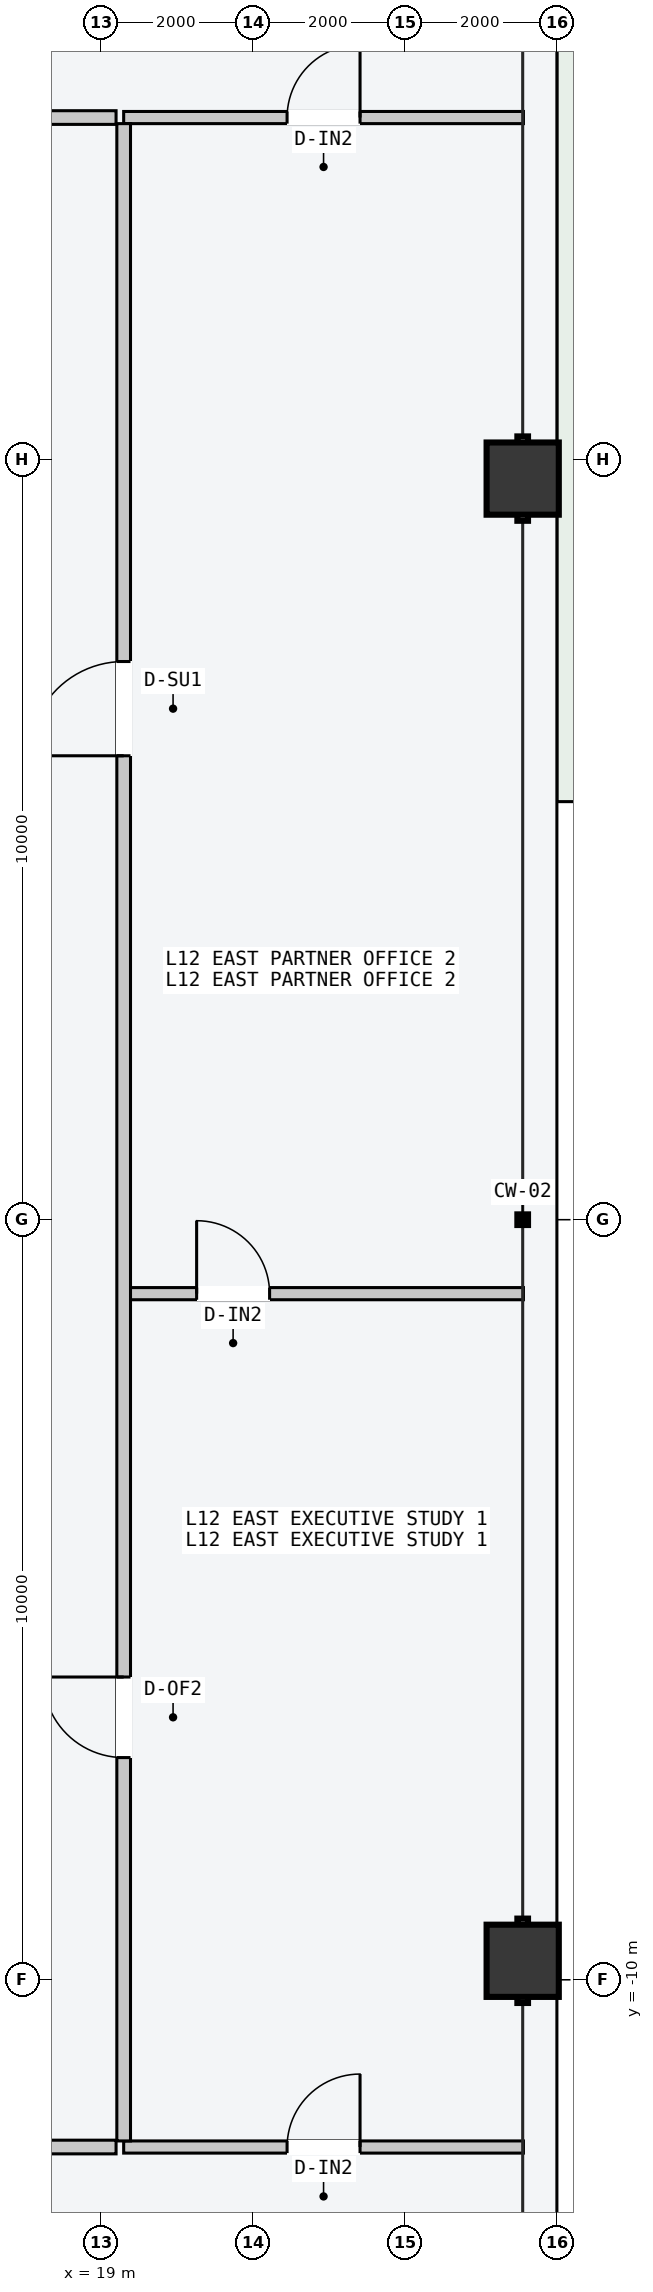
"""IFC4 building model, lengths in metres.
Left out: names, types, materials, properties, quantities, classifications, styles, units other than length and angle.
Written with IfcOpenShell. Run it as: python <this file> out.ifc"""

import sys

from ifc_helpers import new_model, si_unit, direction, frame, frame_2d, origin, origin_2d, place, context, subcontext, project, spatial, rectangle, hollow_rectangle, extrude, element, fill, save


model = new_model("IFC4")
c1 = context("Model", 3, precision=1e-05, world=origin(), true_north=direction((0.0, 1.0)))
c2 = subcontext(c1, "Body", "Model", "MODEL_VIEW")
j1 = project(units=[si_unit("LENGTHUNIT", "METRE"), si_unit("PLANEANGLEUNIT", "RADIAN")], contexts=[c1])
p1 = place(None, origin())
s1 = spatial("IfcSite", under=j1, at=p1, CompositionType="ELEMENT")
p2 = place(p1, origin())
s2 = spatial("IfcBuilding", under=s1, at=p2, CompositionType="ELEMENT")
p3 = place(p2, frame((0.0, 0.0, 49.2)))
s3 = spatial("IfcBuildingStorey", under=s2, at=p3, CompositionType="ELEMENT", Elevation=49.2)
for number, where, z_axis, x_axis in (
    (1, (24.55, -9.75, 0.0), (0.0, 0.0, 1.0), (0.0, 1.0, 0.0)),
    (2, (24.55, 9.75, 0.0), (0.0, 0.0, 1.0), (0.0, 1.0, 0.0)),
):
    element("IfcColumn", number, at=place(p3, frame(where, z_axis=z_axis, x_axis=x_axis)), inside=s3, PredefinedType="COLUMN", context=c2, shape_type="SweptSolid", body=[
        extrude(hollow_rectangle(XDim=0.95, YDim=0.95, WallThickness=0.048, at=origin_2d()), origin(), (0.0, 0.0, 1.0), 3.6),
    ])
p4 = place(p3, frame((-19.2, 14.5, 0.0), z_axis=(0.0, 0.0, 1.0), x_axis=(1.0, 0.0, 0.0)))
e3 = element("IfcWall", 3, at=p4, inside=s3, PredefinedType="PARTITIONING", context=c2, shape_type="SweptSolid", body=[
    extrude(rectangle(XDim=38.4, YDim=0.18, at=frame_2d((19.2, 0.0))), origin(), (0.0, 0.0, 1.0), 3.4),
])
p5 = place(p4, frame((3.515, 0.0, 0.0)))
e4 = element("IfcOpeningElement", 4, at=p5, cuts=e3, PredefinedType="OPENING", context=c2, shape_type="SweptSolid", body=[
    extrude(rectangle(XDim=1.02, YDim=2.2, at=frame_2d((0.51, 1.1))), frame((0.0, 0.1, 0.0), z_axis=(0.0, -1.0, 0.0), x_axis=(1.0, 0.0, 0.0)), (0.0, 0.0, 1.0), 0.2),
])
p6 = place(p4, frame((14.091, 0.0, 0.0)))
e5 = element("IfcOpeningElement", 5, at=p6, cuts=e3, PredefinedType="OPENING", context=c2, shape_type="SweptSolid", body=[
    extrude(rectangle(XDim=1.06, YDim=2.2, at=frame_2d((0.53, 1.1))), frame((0.0, 0.1, 0.0), z_axis=(0.0, -1.0, 0.0), x_axis=(1.0, 0.0, 0.0)), (0.0, 0.0, 1.0), 0.2),
])
p7 = place(p4, frame((24.752, 0.0, 0.0)))
e6 = element("IfcOpeningElement", 6, at=p7, cuts=e3, PredefinedType="OPENING", context=c2, shape_type="SweptSolid", body=[
    extrude(rectangle(XDim=1.24, YDim=2.24, at=frame_2d((0.62, 1.12))), frame((0.0, 0.1, 0.0), z_axis=(0.0, -1.0, 0.0), x_axis=(1.0, 0.0, 0.0)), (0.0, 0.0, 1.0), 0.2),
])
p8 = place(p4, frame((33.277, 0.0, 0.0)))
e7 = element("IfcOpeningElement", 7, at=p8, cuts=e3, PredefinedType="OPENING", context=c2, shape_type="SweptSolid", body=[
    extrude(rectangle(XDim=1.4, YDim=2.2, at=frame_2d((0.7, 1.1))), frame((0.0, 0.1, 0.0), z_axis=(0.0, -1.0, 0.0), x_axis=(1.0, 0.0, 0.0)), (0.0, 0.0, 1.0), 0.2),
])
p9 = place(p3, frame((19.3, 14.5, 0.0), z_axis=(0.0, 0.0, 1.0), x_axis=(1.0, 0.0, 0.0)))
e8 = element("IfcWall", 8, at=p9, inside=s3, PredefinedType="PARTITIONING", context=c2, shape_type="SweptSolid", body=[
    extrude(rectangle(XDim=5.26, YDim=0.16, at=frame_2d((2.63, 0.0))), origin(), (0.0, 0.0, 1.0), 3.4),
])
p10 = place(p9, frame((2.15, 0.0, 0.0)))
e9 = element("IfcOpeningElement", 9, at=p10, cuts=e8, PredefinedType="OPENING", context=c2, shape_type="SweptSolid", body=[
    extrude(rectangle(XDim=0.96, YDim=2.18, at=frame_2d((0.48, 1.09))), frame((0.0, 0.09, 0.0), z_axis=(0.0, -1.0, 0.0), x_axis=(1.0, 0.0, 0.0)), (0.0, 0.0, 1.0), 0.18),
])
p11 = place(p3, frame((-19.2, -12.2, 0.0), z_axis=(0.0, 0.0, 1.0), x_axis=(1.0, 0.0, 0.0)))
e10 = element("IfcWall", 10, at=p11, inside=s3, PredefinedType="PARTITIONING", context=c2, shape_type="SweptSolid", body=[
    extrude(rectangle(XDim=38.4, YDim=0.18, at=frame_2d((19.2, 0.0))), origin(), (0.0, 0.0, 1.0), 3.4),
])
p12 = place(p11, frame((3.524, 0.0, 0.0)))
e11 = element("IfcOpeningElement", 11, at=p12, cuts=e10, PredefinedType="OPENING", context=c2, shape_type="SweptSolid", body=[
    extrude(rectangle(XDim=1.4, YDim=2.2, at=frame_2d((0.7, 1.1))), frame((0.0, 0.1, 0.0), z_axis=(0.0, -1.0, 0.0), x_axis=(1.0, 0.0, 0.0)), (0.0, 0.0, 1.0), 0.2),
])
p13 = place(p11, frame((14.768, 0.0, 0.0)))
e12 = element("IfcOpeningElement", 12, at=p13, cuts=e10, PredefinedType="OPENING", context=c2, shape_type="SweptSolid", body=[
    extrude(rectangle(XDim=0.9, YDim=2.15, at=frame_2d((0.45, 1.075))), frame((0.0, 0.1, 0.0), z_axis=(0.0, -1.0, 0.0), x_axis=(1.0, 0.0, 0.0)), (0.0, 0.0, 1.0), 0.2),
])
p14 = place(p11, frame((29.714, 0.0, 0.0)))
e13 = element("IfcOpeningElement", 13, at=p14, cuts=e10, PredefinedType="OPENING", context=c2, shape_type="SweptSolid", body=[
    extrude(rectangle(XDim=0.96, YDim=2.18, at=frame_2d((0.48, 1.09))), frame((0.0, 0.1, 0.0), z_axis=(0.0, -1.0, 0.0), x_axis=(1.0, 0.0, 0.0)), (0.0, 0.0, 1.0), 0.2),
])
p15 = place(p3, frame((19.3, -12.2, 0.0), z_axis=(0.0, 0.0, 1.0), x_axis=(1.0, 0.0, 0.0)))
e14 = element("IfcWall", 14, at=p15, inside=s3, PredefinedType="PARTITIONING", context=c2, shape_type="SweptSolid", body=[
    extrude(rectangle(XDim=5.26, YDim=0.16, at=frame_2d((2.63, 0.0))), origin(), (0.0, 0.0, 1.0), 3.4),
])
p16 = place(p15, frame((2.15, 0.0, 0.0)))
e15 = element("IfcOpeningElement", 15, at=p16, cuts=e14, PredefinedType="OPENING", context=c2, shape_type="SweptSolid", body=[
    extrude(rectangle(XDim=0.96, YDim=2.18, at=frame_2d((0.48, 1.09))), frame((0.0, 0.09, 0.0), z_axis=(0.0, -1.0, 0.0), x_axis=(1.0, 0.0, 0.0)), (0.0, 0.0, 1.0), 0.18),
])
p17 = place(p3, frame((19.36, -0.973, 0.0), z_axis=(0.0, 0.0, 1.0), x_axis=(1.0, 0.0, 0.0)))
e16 = element("IfcWall", 16, at=p17, inside=s3, PredefinedType="PARTITIONING", context=c2, shape_type="SweptSolid", body=[
    extrude(rectangle(XDim=5.2, YDim=0.16, at=frame_2d((2.6, 0.0))), origin(), (0.0, 0.0, 1.0), 3.4),
])
p18 = place(p17, frame((0.9, 0.0, 0.0)))
e17 = element("IfcOpeningElement", 17, at=p18, cuts=e16, PredefinedType="OPENING", context=c2, shape_type="SweptSolid", body=[
    extrude(rectangle(XDim=0.96, YDim=2.18, at=frame_2d((0.48, 1.09))), frame((0.0, 0.09, 0.0), z_axis=(0.0, -1.0, 0.0), x_axis=(1.0, 0.0, 0.0)), (0.0, 0.0, 1.0), 0.18),
])
p19 = place(p3, frame((19.3, -12.12, 0.0), z_axis=(0.0, 0.0, 1.0), x_axis=(0.0, 1.0, 0.0)))
e18 = element("IfcWall", 18, at=p19, inside=s3, PredefinedType="PARTITIONING", context=c2, shape_type="SweptSolid", body=[
    extrude(rectangle(XDim=26.54, YDim=0.18, at=frame_2d((13.27, 0.0))), origin(), (0.0, 0.0, 1.0), 3.4),
])
p20 = place(p19, frame((5.043, 0.0, 0.0)))
e19 = element("IfcOpeningElement", 19, at=p20, cuts=e18, PredefinedType="OPENING", context=c2, shape_type="SweptSolid", body=[
    extrude(rectangle(XDim=1.06, YDim=2.2, at=frame_2d((0.53, 1.1))), frame((0.0, 0.1, 0.0), z_axis=(0.0, -1.0, 0.0), x_axis=(1.0, 0.0, 0.0)), (0.0, 0.0, 1.0), 0.2),
])
p21 = place(p19, frame((18.223, 0.0, 0.0)))
e20 = element("IfcOpeningElement", 20, at=p21, cuts=e18, PredefinedType="OPENING", context=c2, shape_type="SweptSolid", body=[
    extrude(rectangle(XDim=1.24, YDim=2.24, at=frame_2d((0.62, 1.12))), frame((0.0, 0.1, 0.0), z_axis=(0.0, -1.0, 0.0), x_axis=(1.0, 0.0, 0.0)), (0.0, 0.0, 1.0), 0.2),
])
p22 = place(p10, origin())
e21 = element("IfcDoor", 21, at=p22, inside=s3, OperationType="SINGLE_SWING_RIGHT", PredefinedType="DOOR", context=c2, shape_type="SweptSolid", body=[
    extrude(rectangle(XDim=0.96, YDim=2.18, at=frame_2d((0.48, 1.09))), frame((0.0, 0.025, 0.0), z_axis=(0.0, -1.0, 0.0), x_axis=(1.0, 0.0, 0.0)), (0.0, 0.0, 1.0), 0.05),
])
fill(e9, e21)
p23 = place(p16, origin())
e22 = element("IfcDoor", 22, at=p23, inside=s3, OperationType="SINGLE_SWING_RIGHT", PredefinedType="DOOR", context=c2, shape_type="SweptSolid", body=[
    extrude(rectangle(XDim=0.96, YDim=2.18, at=frame_2d((0.48, 1.09))), frame((0.0, 0.025, 0.0), z_axis=(0.0, -1.0, 0.0), x_axis=(1.0, 0.0, 0.0)), (0.0, 0.0, 1.0), 0.05),
])
fill(e15, e22)
p24 = place(p18, origin())
e23 = element("IfcDoor", 23, at=p24, inside=s3, OperationType="SINGLE_SWING_LEFT", PredefinedType="DOOR", context=c2, shape_type="SweptSolid", body=[
    extrude(rectangle(XDim=0.96, YDim=2.18, at=frame_2d((0.48, 1.09))), frame((0.0, 0.025, 0.0), z_axis=(0.0, -1.0, 0.0), x_axis=(1.0, 0.0, 0.0)), (0.0, 0.0, 1.0), 0.05),
])
fill(e17, e23)
p25 = place(p20, origin())
e24 = element("IfcDoor", 24, at=p25, inside=s3, OperationType="SINGLE_SWING_RIGHT", PredefinedType="DOOR", context=c2, shape_type="SweptSolid", body=[
    extrude(rectangle(XDim=1.06, YDim=2.2, at=frame_2d((0.53, 1.1))), frame((0.0, 0.025, 0.0), z_axis=(0.0, -1.0, 0.0), x_axis=(1.0, 0.0, 0.0)), (0.0, 0.0, 1.0), 0.05),
])
fill(e19, e24)
p26 = place(p21, origin())
e25 = element("IfcDoor", 25, at=p26, inside=s3, OperationType="SINGLE_SWING_LEFT", PredefinedType="DOOR", context=c2, shape_type="SweptSolid", body=[
    extrude(rectangle(XDim=1.24, YDim=2.24, at=frame_2d((0.62, 1.12))), frame((0.0, 0.025, 0.0), z_axis=(0.0, -1.0, 0.0), x_axis=(1.0, 0.0, 0.0)), (0.0, 0.0, 1.0), 0.05),
])
fill(e20, e25)
save(model, sys.argv[1])
